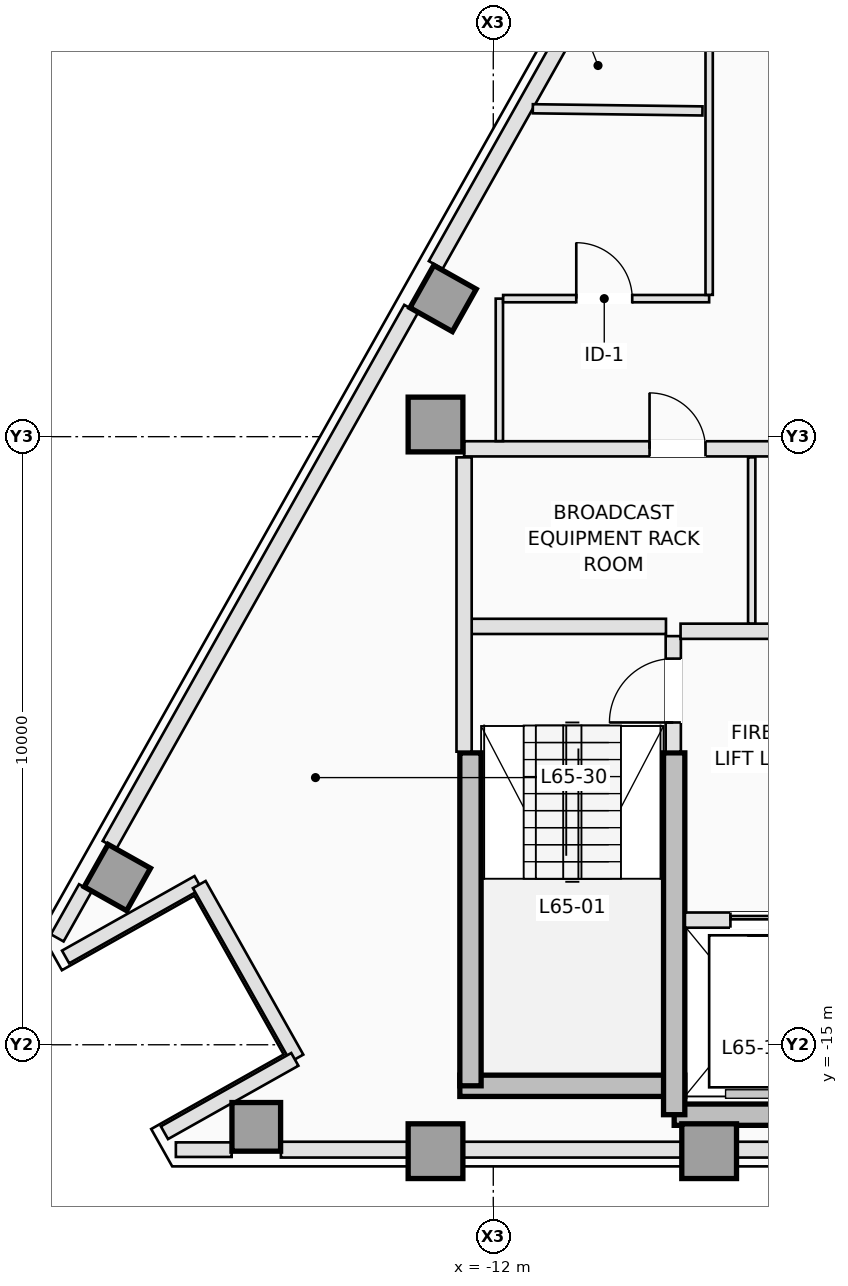
"""IFC4 building model, lengths in metres.
Left out: names, types, materials, properties, quantities, classifications, styles, units other than length and angle.
Written with IfcOpenShell. Run it as: python <this file> out.ifc"""

import sys

from ifc_helpers import new_model, si_unit, direction, frame, frame_2d, origin, origin_2d, place, context, subcontext, project, spatial, rectangle, extrude, element, fill, save


model = new_model("IFC4")
c1 = context("Model", 3, precision=1e-05, world=origin(), true_north=direction((0.0, 1.0)))
c2 = subcontext(c1, "Body", "Model", "MODEL_VIEW")
j1 = project(units=[si_unit("LENGTHUNIT", "METRE"), si_unit("PLANEANGLEUNIT", "RADIAN")], contexts=[c1])
p1 = place(None, origin())
s1 = spatial("IfcSite", under=j1, at=p1, CompositionType="ELEMENT")
p2 = place(p1, origin())
s2 = spatial("IfcBuilding", under=s1, at=p2, CompositionType="ELEMENT")
p3 = place(p2, frame((0.0, 0.0, 235.9)))
s3 = spatial("IfcBuildingStorey", under=s2, at=p3, CompositionType="ELEMENT", Elevation=235.9)
p4 = place(p3, frame((-12.55, -15.675, 0.0), z_axis=(0.0, 0.0, 1.0), x_axis=(1.0, 0.0, 0.0)))
e1 = element("IfcWall", 1, at=p4, inside=s3, PredefinedType="SHEAR", context=c2, shape_type="SweptSolid", body=[
    extrude(rectangle(XDim=3.7, YDim=0.35, at=frame_2d((1.85, 0.0))), origin(), (0.0, 0.0, 1.0), 3.5),
])
p5 = place(p3, frame((-9.025, -16.15, 0.0), z_axis=(0.0, 0.0, 1.0), x_axis=(1.0, 0.0, 0.0)))
e2 = element("IfcWall", 2, at=p5, inside=s3, PredefinedType="SHEAR", context=c2, shape_type="SweptSolid", body=[
    extrude(rectangle(XDim=5.275, YDim=0.35, at=frame_2d((2.637, 0.0))), origin(), (0.0, 0.0, 1.0), 3.5),
])
p6 = place(p3, frame((-12.375, -15.675, 0.0), z_axis=(0.0, 0.0, 1.0), x_axis=(0.0, 1.0, 0.0)))
e3 = element("IfcWall", 3, at=p6, inside=s3, PredefinedType="SHEAR", context=c2, shape_type="SweptSolid", body=[
    extrude(rectangle(XDim=5.475, YDim=0.35, at=frame_2d((2.738, 0.0))), origin(), (0.0, 0.0, 1.0), 3.5),
])
p7 = place(p3, frame((-9.025, -16.15, 0.0), z_axis=(0.0, 0.0, 1.0), x_axis=(0.0, 1.0, 0.0)))
e4 = element("IfcWall", 4, at=p7, inside=s3, PredefinedType="SHEAR", context=c2, shape_type="SweptSolid", body=[
    extrude(rectangle(XDim=5.95, YDim=0.35, at=frame_2d((2.975, 0.0))), origin(), (0.0, 0.0, 1.0), 3.5),
])
for number, where, z_axis, x_axis in (
    (5, (-12.95, -16.75, 0.0), (0.0, 0.0, 1.0), (1.0, 0.0, 0.0)),
    (6, (-8.45, -16.75, 0.0), (0.0, 0.0, 1.0), (1.0, 0.0, 0.0)),
    (7, (-12.95, -4.8, 0.0), (0.0, 0.0, 1.0), (1.0, 0.0, 0.0)),
):
    element("IfcColumn", number, at=place(p3, frame(where, z_axis=z_axis, x_axis=x_axis)), inside=s3, PredefinedType="COLUMN", context=c2, shape_type="SweptSolid", body=[
        extrude(rectangle(XDim=0.9, YDim=0.9, at=origin_2d()), origin(), (0.0, 0.0, 1.0), 3.5),
    ])
for number, where, z_axis, x_axis in (
    (8, (-15.898, -16.35, 0.0), (0.0, 0.0, 1.0), (0.0, 1.0, 0.0)),
    (9, (-12.825, -2.727, 0.0), (0.0, 0.0, 1.0), (-0.872, 0.49, 0.0)),
    (10, (-18.182, -12.25, 0.0), (0.0, 0.0, 1.0), (-0.872, 0.49, 0.0)),
):
    element("IfcColumn", number, at=place(p3, frame(where, z_axis=z_axis, x_axis=x_axis)), inside=s3, PredefinedType="COLUMN", context=c2, shape_type="SweptSolid", body=[
        extrude(rectangle(XDim=0.8, YDim=0.8, at=origin_2d()), origin(), (0.0, 0.0, 1.0), 3.5),
    ])
p8 = place(p3, frame((-16.302, -16.725, 0.0), z_axis=(0.0, 0.0, 1.0), x_axis=(-1.0, 0.0, 0.0)))
e11 = element("IfcWall", 11, at=p8, inside=s3, PredefinedType="STANDARD", context=c2, shape_type="SweptSolid", body=[
    extrude(rectangle(XDim=0.917, YDim=0.24, at=frame_2d((0.459, 0.0))), origin(), (0.0, 0.0, 1.0), 3.25),
])
p9 = place(p3, frame((-4.22, -16.725, 0.0), z_axis=(0.0, 0.0, 1.0), x_axis=(-1.0, 0.0, 0.0)))
e12 = element("IfcWall", 12, at=p9, inside=s3, PredefinedType="STANDARD", context=c2, shape_type="SweptSolid", body=[
    extrude(rectangle(XDim=11.273, YDim=0.26, at=frame_2d((5.636, 0.0))), origin(), (0.0, 0.0, 1.0), 2.79),
])
p10 = place(p3, frame((-19.171, -13.242, 0.0), z_axis=(0.0, 0.0, 1.0), x_axis=(0.490199895283, 0.871610040479, 0.0)))
e13 = element("IfcWall", 13, at=p10, inside=s3, PredefinedType="STANDARD", context=c2, shape_type="SweptSolid", body=[
    extrude(rectangle(XDim=0.945, YDim=0.24, at=frame_2d((0.472, 0.0))), origin(), (0.0, 0.0, 1.0), 3.25),
])
p11 = place(p3, frame((-18.311, -11.713, 0.0), z_axis=(0.0, 0.0, 1.0), x_axis=(0.490266968583, 0.871572314565, 0.0)))
e14 = element("IfcWall", 14, at=p11, inside=s3, PredefinedType="STANDARD", context=c2, shape_type="SweptSolid", body=[
    extrude(rectangle(XDim=10.116, YDim=0.26, at=frame_2d((5.058, 0.0))), origin(), (0.0, 0.0, 1.0), 3.25),
])
p12 = place(p3, frame((-12.946, -2.177, 0.0), z_axis=(0.0, 0.0, 1.0), x_axis=(0.490244825075, 0.871584770109, 0.0)))
e15 = element("IfcWall", 15, at=p12, inside=s3, PredefinedType="STANDARD", context=c2, shape_type="SweptSolid", body=[
    extrude(rectangle(XDim=4.237, YDim=0.26, at=frame_2d((2.119, 0.0))), origin(), (0.0, 0.0, 1.0), 3.25),
])
p13 = place(p3, frame((-19.033, -13.556, 0.0), z_axis=(0.0, 0.0, 1.0), x_axis=(0.871588577066, 0.490238056792, 0.0)))
e16 = element("IfcWall", 16, at=p13, inside=s3, PredefinedType="STANDARD", context=c2, shape_type="SweptSolid", body=[
    extrude(rectangle(XDim=2.5, YDim=0.24, at=frame_2d((1.25, 0.0))), origin(), (0.0, 0.0, 1.0), 3.25),
])
p14 = place(p3, frame((-16.835, -12.366, 0.0), z_axis=(0.0, 0.0, 1.0), x_axis=(0.490293083368, -0.871557624258, 0.0)))
e17 = element("IfcWall", 17, at=p14, inside=s3, PredefinedType="STANDARD", context=c2, shape_type="SweptSolid", body=[
    extrude(rectangle(XDim=3.276, YDim=0.24, at=frame_2d((1.638, 0.0))), origin(), (0.0, 0.0, 1.0), 2.79),
])
p15 = place(p3, frame((-15.264, -15.24, 0.0), z_axis=(0.0, 0.0, 1.0), x_axis=(-0.87157023615, -0.490270663468, 0.0)))
e18 = element("IfcWall", 18, at=p15, inside=s3, PredefinedType="STANDARD", context=c2, shape_type="SweptSolid", body=[
    extrude(rectangle(XDim=2.46, YDim=0.24, at=frame_2d((1.23, 0.0))), origin(), (0.0, 0.0, 1.0), 3.25),
])
p16 = place(p3, frame((-9.04, -10.18, 0.0), z_axis=(0.0, 0.0, 1.0), x_axis=(0.0, 1.0, 0.0)))
e19 = element("IfcWall", 19, at=p16, inside=s3, PredefinedType="PARTITIONING", context=c2, shape_type="SweptSolid", body=[
    extrude(rectangle(XDim=1.9, YDim=0.25, at=frame_2d((0.95, 0.0))), origin(), (0.0, 0.0, 1.0), 3.25),
])
p17 = place(p16, frame((0.48, 0.0, 0.0)))
e20 = element("IfcOpeningElement", 20, at=p17, cuts=e19, PredefinedType="OPENING", context=c2, shape_type="SweptSolid", body=[
    extrude(rectangle(XDim=1.05, YDim=2.15, at=frame_2d((0.525, 1.075))), frame((0.0, 0.135, 0.0), z_axis=(0.0, -1.0, 0.0), x_axis=(1.0, 0.0, 0.0)), (0.0, 0.0, 1.0), 0.27),
])
p18 = place(p3, frame((-12.38, -8.12, 0.0), z_axis=(0.0, 0.0, 1.0), x_axis=(1.0, 0.0, 0.0)))
e21 = element("IfcWall", 21, at=p18, inside=s3, PredefinedType="PARTITIONING", context=c2, shape_type="SweptSolid", body=[
    extrude(rectangle(XDim=3.22, YDim=0.25, at=frame_2d((1.61, 0.0))), origin(), (0.0, 0.0, 1.0), 3.25),
])
p19 = place(p3, frame((-12.48, -10.18, 0.0), z_axis=(0.0, 0.0, 1.0), x_axis=(0.0, 1.0, 0.0)))
e22 = element("IfcWall", 22, at=p19, inside=s3, PredefinedType="PARTITIONING", context=c2, shape_type="SweptSolid", body=[
    extrude(rectangle(XDim=4.84, YDim=0.25, at=frame_2d((2.42, 0.0))), origin(), (0.0, 0.0, 1.0), 3.25),
])
p20 = place(p3, frame((-8.848, -12.95, 0.0), z_axis=(0.0, 0.0, 1.0), x_axis=(1.0, 0.0, 0.0)))
e23 = element("IfcWall", 23, at=p20, inside=s3, PredefinedType="PARTITIONING", context=c2, shape_type="SweptSolid", body=[
    extrude(rectangle(XDim=5.168, YDim=0.25, at=frame_2d((2.584, 0.0))), origin(), (0.0, 0.0, 1.0), 3.25),
])
p21 = place(p20, frame((0.748, 0.0, 0.0)))
e24 = element("IfcOpeningElement", 24, at=p21, cuts=e23, PredefinedType="OPENING", context=c2, shape_type="SweptSolid", body=[
    extrude(rectangle(XDim=1.1, YDim=2.15, at=frame_2d((0.55, 1.075))), frame((0.0, 0.135, 0.0), z_axis=(0.0, -1.0, 0.0), x_axis=(1.0, 0.0, 0.0)), (0.0, 0.0, 1.0), 0.27),
])
p22 = place(p20, frame((2.648, 0.0, 0.0)))
e25 = element("IfcOpeningElement", 25, at=p22, cuts=e23, PredefinedType="OPENING", context=c2, shape_type="SweptSolid", body=[
    extrude(rectangle(XDim=0.88, YDim=2.1, at=frame_2d((0.44, 1.05))), frame((0.0, 0.135, 0.0), z_axis=(0.0, -1.0, 0.0), x_axis=(1.0, 0.0, 0.0)), (0.0, 0.0, 1.0), 0.27),
])
p23 = place(p20, frame((4.048, 0.0, 0.0)))
e26 = element("IfcOpeningElement", 26, at=p23, cuts=e23, PredefinedType="OPENING", context=c2, shape_type="SweptSolid", body=[
    extrude(rectangle(XDim=0.88, YDim=2.1, at=frame_2d((0.44, 1.05))), frame((0.0, 0.135, 0.0), z_axis=(0.0, -1.0, 0.0), x_axis=(1.0, 0.0, 0.0)), (0.0, 0.0, 1.0), 0.27),
])
p24 = place(p3, frame((-8.92, -8.2, 0.0), z_axis=(0.0, 0.0, 1.0), x_axis=(1.0, 0.0, 0.0)))
e27 = element("IfcWall", 27, at=p24, inside=s3, PredefinedType="PARTITIONING", context=c2, shape_type="SweptSolid", body=[
    extrude(rectangle(XDim=5.24, YDim=0.25, at=frame_2d((2.62, 0.0))), origin(), (0.0, 0.0, 1.0), 3.25),
])
p25 = place(p3, frame((-12.48, -5.2, 0.0), z_axis=(0.0, 0.0, 1.0), x_axis=(1.0, 0.0, 0.0)))
e28 = element("IfcWall", 28, at=p25, inside=s3, PredefinedType="PARTITIONING", context=c2, shape_type="SweptSolid", body=[
    extrude(rectangle(XDim=8.278, YDim=0.25, at=frame_2d((4.139, 0.0))), origin(), (0.0, 0.0, 1.0), 3.25),
])
p26 = place(p25, frame((3.05, 0.0, 0.0)))
e29 = element("IfcOpeningElement", 29, at=p26, cuts=e28, PredefinedType="OPENING", context=c2, shape_type="SweptSolid", body=[
    extrude(rectangle(XDim=0.92, YDim=2.12, at=frame_2d((0.46, 1.06))), frame((0.0, 0.135, 0.0), z_axis=(0.0, -1.0, 0.0), x_axis=(1.0, 0.0, 0.0)), (0.0, 0.0, 1.0), 0.27),
])
p27 = place(p25, frame((6.15, 0.0, 0.0)))
e30 = element("IfcOpeningElement", 30, at=p27, cuts=e28, PredefinedType="OPENING", context=c2, shape_type="SweptSolid", body=[
    extrude(rectangle(XDim=0.92, YDim=2.12, at=frame_2d((0.46, 1.06))), frame((0.0, 0.135, 0.0), z_axis=(0.0, -1.0, 0.0), x_axis=(1.0, 0.0, 0.0)), (0.0, 0.0, 1.0), 0.27),
])
p28 = place(p3, frame((-7.75, -8.073, 0.0), z_axis=(0.0, 0.0, 1.0), x_axis=(0.0, 1.0, 0.0)))
e31 = element("IfcWall", 31, at=p28, inside=s3, PredefinedType="PARTITIONING", context=c2, shape_type="SweptSolid", body=[
    extrude(rectangle(XDim=2.733, YDim=0.12, at=frame_2d((1.366, 0.0))), origin(), (0.0, 0.0, 1.0), 3.25),
])
p29 = place(p3, frame((-11.9, -5.073, 0.0), z_axis=(0.0, 0.0, 1.0), x_axis=(0.0, 1.0, 0.0)))
e32 = element("IfcWall", 32, at=p29, inside=s3, PredefinedType="PARTITIONING", context=c2, shape_type="SweptSolid", body=[
    extrude(rectangle(XDim=2.343, YDim=0.12, at=frame_2d((1.171, 0.0))), origin(), (0.0, 0.0, 1.0), 3.25),
])
p30 = place(p3, frame((-11.838, -2.73, 0.0), z_axis=(0.0, 0.0, 1.0), x_axis=(1.0, 0.0, 0.0)))
e33 = element("IfcWall", 33, at=p30, inside=s3, PredefinedType="PARTITIONING", context=c2, shape_type="SweptSolid", body=[
    extrude(rectangle(XDim=3.388, YDim=0.12, at=frame_2d((1.694, 0.0))), origin(), (0.0, 0.0, 1.0), 3.25),
])
p31 = place(p30, frame((1.203, 0.0, 0.0)))
e34 = element("IfcOpeningElement", 34, at=p31, cuts=e33, PredefinedType="OPENING", context=c2, shape_type="SweptSolid", body=[
    extrude(rectangle(XDim=0.92, YDim=2.12, at=frame_2d((0.46, 1.06))), frame((0.0, 0.07, 0.0), z_axis=(0.0, -1.0, 0.0), x_axis=(1.0, 0.0, 0.0)), (0.0, 0.0, 1.0), 0.14),
])
p32 = place(p3, frame((-8.45, -2.668, 0.0), z_axis=(0.0, 0.0, 1.0), x_axis=(0.0, 1.0, 0.0)))
e35 = element("IfcWall", 35, at=p32, inside=s3, PredefinedType="PARTITIONING", context=c2, shape_type="SweptSolid", body=[
    extrude(rectangle(XDim=6.21, YDim=0.12, at=frame_2d((3.105, 0.0))), origin(), (0.0, 0.0, 1.0), 3.25),
])
p33 = place(p32, frame((4.047, 0.0, 0.0)))
e36 = element("IfcOpeningElement", 36, at=p33, cuts=e35, PredefinedType="OPENING", context=c2, shape_type="SweptSolid", body=[
    extrude(rectangle(XDim=0.92, YDim=2.12, at=frame_2d((0.46, 1.06))), frame((0.0, 0.07, 0.0), z_axis=(0.0, -1.0, 0.0), x_axis=(1.0, 0.0, 0.0)), (0.0, 0.0, 1.0), 0.14),
])
p34 = place(p3, frame((-8.56, 0.357, 0.0), z_axis=(0.0, 0.0, 1.0), x_axis=(-0.999917251082, 0.012864330116, 0.0)))
e37 = element("IfcWall", 37, at=p34, inside=s3, PredefinedType="PARTITIONING", context=c2, shape_type="SweptSolid", body=[
    extrude(rectangle(XDim=2.79, YDim=0.15, at=frame_2d((1.395, 0.0))), origin(), (0.0, 0.0, 1.0), 3.25),
])
p35 = place(p21, origin())
e38 = element("IfcDoor", 38, at=p35, inside=s3, OperationType="SLIDING_TO_LEFT", PredefinedType="DOOR", context=c2, shape_type="SweptSolid", body=[
    extrude(rectangle(XDim=1.1, YDim=2.15, at=frame_2d((0.55, 1.075))), frame((0.0, 0.025, 0.0), z_axis=(0.0, -1.0, 0.0), x_axis=(1.0, 0.0, 0.0)), (0.0, 0.0, 1.0), 0.05),
])
fill(e24, e38)
p36 = place(p17, origin())
e39 = element("IfcDoor", 39, at=p36, inside=s3, OperationType="SINGLE_SWING_LEFT", PredefinedType="DOOR", context=c2, shape_type="SweptSolid", body=[
    extrude(rectangle(XDim=1.05, YDim=2.15, at=frame_2d((0.525, 1.075))), frame((0.0, 0.025, 0.0), z_axis=(0.0, -1.0, 0.0), x_axis=(1.0, 0.0, 0.0)), (0.0, 0.0, 1.0), 0.05),
])
fill(e20, e39)
p37 = place(p26, origin())
e40 = element("IfcDoor", 40, at=p37, inside=s3, OperationType="SINGLE_SWING_LEFT", PredefinedType="DOOR", context=c2, shape_type="SweptSolid", body=[
    extrude(rectangle(XDim=0.92, YDim=2.12, at=frame_2d((0.46, 1.06))), frame((0.0, 0.025, 0.0), z_axis=(0.0, -1.0, 0.0), x_axis=(1.0, 0.0, 0.0)), (0.0, 0.0, 1.0), 0.05),
])
fill(e29, e40)
p38 = place(p31, origin())
e41 = element("IfcDoor", 41, at=p38, inside=s3, OperationType="SINGLE_SWING_LEFT", PredefinedType="DOOR", context=c2, shape_type="SweptSolid", body=[
    extrude(rectangle(XDim=0.92, YDim=2.12, at=frame_2d((0.46, 1.06))), frame((0.0, 0.025, 0.0), z_axis=(0.0, -1.0, 0.0), x_axis=(1.0, 0.0, 0.0)), (0.0, 0.0, 1.0), 0.05),
])
fill(e34, e41)
save(model, sys.argv[1])
